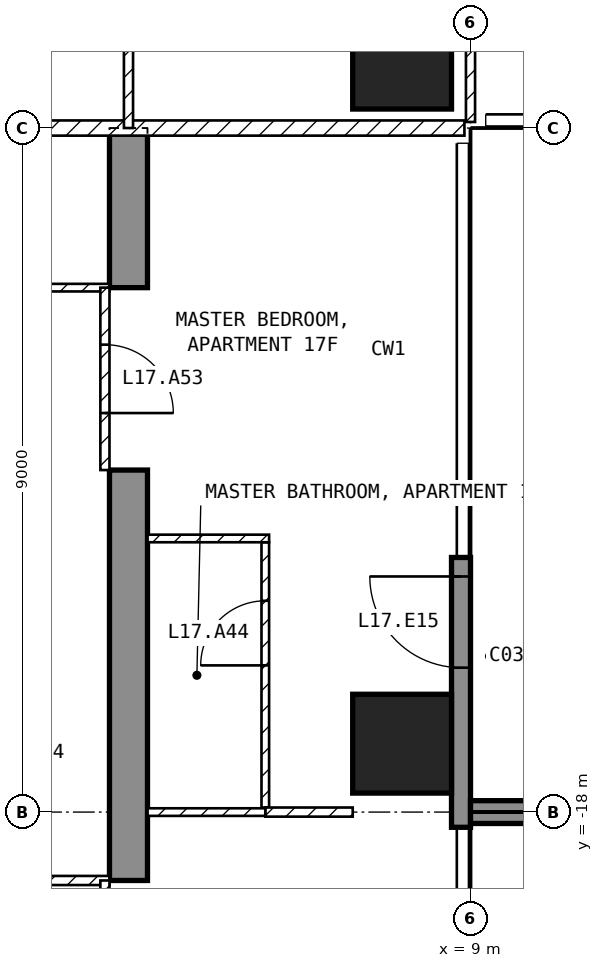
"""IFC4 building model, lengths in metres.
Left out: names, types, materials, properties, quantities, classifications, styles, units other than length and angle.
Written with IfcOpenShell. Run it as: python <this file> out.ifc"""

import sys

from ifc_helpers import new_model, si_unit, direction, frame, frame_2d, origin, origin_2d, place, context, subcontext, project, spatial, polyline, rectangle, outline, extrude, element, fill, save


model = new_model("IFC4")
c1 = context("Model", 3, precision=1e-05, world=origin(), true_north=direction((0.0, 1.0)))
c2 = subcontext(c1, "Body", "Model", "MODEL_VIEW")
j1 = project(units=[si_unit("LENGTHUNIT", "METRE"), si_unit("PLANEANGLEUNIT", "RADIAN")], contexts=[c1])
p1 = place(None, origin())
s1 = spatial("IfcSite", under=j1, at=p1, CompositionType="ELEMENT")
p2 = place(p1, origin())
s2 = spatial("IfcBuilding", under=s1, at=p2, CompositionType="ELEMENT")
p3 = place(p2, frame((0.0, 0.0, 78.5)))
s3 = spatial("IfcBuildingStorey", under=s2, at=p3, CompositionType="ELEMENT", Elevation=78.5)
for number, where, z_axis, x_axis in (
    (1, (8.1, -17.1, -0.25), (0.0, 0.0, 1.0), (1.0, 0.0, 0.0)),
    (2, (8.1, -8.1, -0.25), (0.0, 0.0, 1.0), (1.0, 0.0, 0.0)),
):
    element("IfcColumn", number, at=place(p3, frame(where, z_axis=z_axis, x_axis=x_axis)), inside=s3, PredefinedType="COLUMN", context=c2, shape_type="SweptSolid", body=[
        extrude(rectangle(XDim=1.3, YDim=1.3, at=origin_2d()), origin(), (0.0, 0.0, 1.0), 3.5),
    ])
p4 = place(p3, frame((4.25, -25.45, -0.25), z_axis=(1.0, 0.0, 0.0), x_axis=(0.0, 1.0, 0.0)))
e3 = element("IfcWall", 3, at=p4, inside=s3, PredefinedType="SHEAR", context=c2, shape_type="SweptSolid", body=[
    extrude(outline(polyline([(0.0, 0.0), (4.15, 0.0), (4.15, 2.65), (6.55, 2.65), (6.55, 0.0), (11.95, 0.0), (11.95, 2.65), (14.35, 2.65), (14.35, 0.0), (16.45, 0.0), (16.45, 3.5), (0.0, 3.5), (0.0, 0.0)])), origin(), (0.0, 0.0, 1.0), 0.5),
])
p5 = place(p3, frame((8.875, -18.2, 0.0), z_axis=(0.0, 0.0, 1.0), x_axis=(0.0, 1.0, 0.0)))
e4 = element("IfcWall", 4, at=p5, inside=s3, PredefinedType="SOLIDWALL", context=c2, shape_type="SweptSolid", body=[
    extrude(rectangle(XDim=3.55, YDim=0.25, at=frame_2d((1.775, 0.0))), origin(), (0.0, 0.0, 1.0), 3.25),
])
p6 = place(p5, frame((2.1, 0.0, 0.0)))
e5 = element("IfcOpeningElement", 5, at=p6, cuts=e4, PredefinedType="OPENING", context=c2, shape_type="SweptSolid", body=[
    extrude(rectangle(XDim=1.2, YDim=2.4, at=frame_2d((0.6, 1.2))), frame((0.0, 0.135, 0.0), z_axis=(0.0, -1.0, 0.0), x_axis=(1.0, 0.0, 0.0)), (0.0, 0.0, 1.0), 0.27),
])
p7 = place(p3, frame((9.0, -18.0, 0.0), z_axis=(0.0, 0.0, 1.0), x_axis=(1.0, 0.0, 0.0)))
e6 = element("IfcWall", 6, at=p7, inside=s3, PredefinedType="SOLIDWALL", context=c2, shape_type="SweptSolid", body=[
    extrude(rectangle(XDim=2.7, YDim=0.3, at=frame_2d((1.35, 0.0))), origin(), (0.0, 0.0, 1.0), 3.25),
])
p8 = place(p3, frame((8.92, -9.0, 0.0), z_axis=(0.0, 0.0, 1.0), x_axis=(-1.0, 0.0, 0.0)))
e7 = element("IfcWall", 7, at=p8, inside=s3, PredefinedType="PARTITIONING", context=c2, shape_type="SweptSolid", body=[
    extrude(rectangle(XDim=17.84, YDim=0.2, at=frame_2d((8.92, 0.0))), origin(), (0.0, 0.0, 1.0), 3.25),
])
p9 = place(p8, frame((8.42, 0.0, 0.0)))
e8 = element("IfcOpeningElement", 8, at=p9, cuts=e7, PredefinedType="OPENING", context=c2, shape_type="SweptSolid", body=[
    extrude(rectangle(XDim=1.0, YDim=2.1, at=frame_2d((0.5, 1.05))), frame((0.0, 0.11, 0.0), z_axis=(0.0, -1.0, 0.0), x_axis=(1.0, 0.0, 0.0)), (0.0, 0.0, 1.0), 0.22),
])
p10 = place(p3, frame((9.0, -8.92, 0.0), z_axis=(0.0, 0.0, 1.0), x_axis=(0.0, 1.0, 0.0)))
e9 = element("IfcWall", 9, at=p10, inside=s3, PredefinedType="PARTITIONING", context=c2, shape_type="SweptSolid", body=[
    extrude(rectangle(XDim=7.62, YDim=0.12, at=frame_2d((3.81, 0.0))), origin(), (0.0, 0.0, 1.0), 3.25),
])
p11 = place(p10, frame((2.67, 0.0, 0.0)))
e10 = element("IfcOpeningElement", 10, at=p11, cuts=e9, PredefinedType="OPENING", context=c2, shape_type="SweptSolid", body=[
    extrude(rectangle(XDim=0.9, YDim=2.1, at=frame_2d((0.45, 1.05))), frame((0.0, 0.07, 0.0), z_axis=(0.0, -1.0, 0.0), x_axis=(1.0, 0.0, 0.0)), (0.0, 0.0, 1.0), 0.14),
])
p12 = place(p3, frame((4.5, -9.0, 0.0), z_axis=(0.0, 0.0, 1.0), x_axis=(0.0, 1.0, 0.0)))
e11 = element("IfcWall", 11, at=p12, inside=s3, PredefinedType="PARTITIONING", context=c2, shape_type="SweptSolid", body=[
    extrude(rectangle(XDim=3.9, YDim=0.12, at=frame_2d((1.95, 0.0))), origin(), (0.0, 0.0, 1.0), 3.25),
])
p13 = place(p12, frame((1.5, 0.0, 0.0)))
e12 = element("IfcOpeningElement", 12, at=p13, cuts=e11, PredefinedType="OPENING", context=c2, shape_type="SweptSolid", body=[
    extrude(rectangle(XDim=0.9, YDim=2.1, at=frame_2d((0.45, 1.05))), frame((0.0, 0.07, 0.0), z_axis=(0.0, -1.0, 0.0), x_axis=(1.0, 0.0, 0.0)), (0.0, 0.0, 1.0), 0.14),
])
p14 = place(p3, frame((4.25, -11.1, 0.0), z_axis=(0.0, 0.0, 1.0), x_axis=(-1.0, 0.0, 0.0)))
e13 = element("IfcWall", 13, at=p14, inside=s3, PredefinedType="PARTITIONING", context=c2, shape_type="SweptSolid", body=[
    extrude(rectangle(XDim=2.15, YDim=0.1, at=frame_2d((1.075, 0.0))), origin(), (0.0, 0.0, 1.0), 3.25),
])
p15 = place(p3, frame((4.25, -18.9, 0.0), z_axis=(0.0, 0.0, 1.0), x_axis=(-1.0, 0.0, 0.0)))
e14 = element("IfcWall", 14, at=p15, inside=s3, PredefinedType="PARTITIONING", context=c2, shape_type="SweptSolid", body=[
    extrude(rectangle(XDim=8.5, YDim=0.12, at=frame_2d((4.25, 0.0))), origin(), (0.0, 0.0, 1.0), 3.25),
])
p16 = place(p15, frame((5.675, 0.0, 0.0)))
e15 = element("IfcOpeningElement", 15, at=p16, cuts=e14, PredefinedType="OPENING", context=c2, shape_type="SweptSolid", body=[
    extrude(rectangle(XDim=0.9, YDim=2.1, at=frame_2d((0.45, 1.05))), frame((0.0, 0.07, 0.0), z_axis=(0.0, -1.0, 0.0), x_axis=(1.0, 0.0, 0.0)), (0.0, 0.0, 1.0), 0.14),
])
p17 = place(p3, frame((6.3, -17.94, 0.0), z_axis=(0.0, 0.0, 1.0), x_axis=(0.0, 1.0, 0.0)))
e16 = element("IfcWall", 16, at=p17, inside=s3, PredefinedType="PARTITIONING", context=c2, shape_type="SweptSolid", body=[
    extrude(rectangle(XDim=3.49, YDim=0.1, at=frame_2d((1.745, 0.0))), origin(), (0.0, 0.0, 1.0), 3.25),
])
p18 = place(p17, frame((1.87, 0.0, 0.0)))
e17 = element("IfcOpeningElement", 17, at=p18, cuts=e16, PredefinedType="OPENING", context=c2, shape_type="SweptSolid", body=[
    extrude(rectangle(XDim=0.85, YDim=2.1, at=frame_2d((0.425, 1.05))), frame((0.0, 0.06, 0.0), z_axis=(0.0, -1.0, 0.0), x_axis=(1.0, 0.0, 0.0)), (0.0, 0.0, 1.0), 0.12),
])
p19 = place(p3, frame((6.35, -14.4, 0.0), z_axis=(0.0, 0.0, 1.0), x_axis=(-1.0, 0.0, 0.0)))
e18 = element("IfcWall", 18, at=p19, inside=s3, PredefinedType="PARTITIONING", context=c2, shape_type="SweptSolid", body=[
    extrude(rectangle(XDim=1.6, YDim=0.1, at=frame_2d((0.8, 0.0))), origin(), (0.0, 0.0, 1.0), 3.25),
])
p20 = place(p3, frame((7.45, -18.0, 0.0), z_axis=(0.0, 0.0, 1.0), x_axis=(-1.0, 0.0, 0.0)))
e19 = element("IfcWall", 19, at=p20, inside=s3, PredefinedType="PARTITIONING", context=c2, shape_type="SweptSolid", body=[
    extrude(rectangle(XDim=1.15, YDim=0.12, at=frame_2d((0.575, 0.0))), origin(), (0.0, 0.0, 1.0), 3.25),
])
p21 = place(p3, frame((6.3, -18.0, 0.0), z_axis=(0.0, 0.0, 1.0), x_axis=(-1.0, 0.0, 0.0)))
e20 = element("IfcWall", 20, at=p21, inside=s3, PredefinedType="PARTITIONING", context=c2, shape_type="SweptSolid", body=[
    extrude(rectangle(XDim=1.55, YDim=0.1, at=frame_2d((0.775, 0.0))), origin(), (0.0, 0.0, 1.0), 3.25),
])
p22 = place(p3, frame((4.19, -11.1, 0.0), z_axis=(0.0, 0.0, 1.0), x_axis=(0.0, -1.0, 0.0)))
e21 = element("IfcWall", 21, at=p22, inside=s3, PredefinedType="PARTITIONING", context=c2, shape_type="SweptSolid", body=[
    extrude(rectangle(XDim=2.4, YDim=0.12, at=frame_2d((1.2, 0.0))), origin(), (0.0, 0.0, 1.0), 2.4),
])
p23 = place(p22, frame((0.75, 0.0, 0.0)))
e22 = element("IfcOpeningElement", 22, at=p23, cuts=e21, PredefinedType="OPENING", context=c2, shape_type="SweptSolid", body=[
    extrude(rectangle(XDim=0.9, YDim=2.1, at=frame_2d((0.45, 1.05))), frame((0.0, 0.07, 0.0), z_axis=(0.0, -1.0, 0.0), x_axis=(1.0, 0.0, 0.0)), (0.0, 0.0, 1.0), 0.14),
])
p24 = place(p3, frame((4.19, -18.9, 0.0), z_axis=(0.0, 0.0, 1.0), x_axis=(0.0, -1.0, 0.0)))
e23 = element("IfcWall", 23, at=p24, inside=s3, PredefinedType="PARTITIONING", context=c2, shape_type="SweptSolid", body=[
    extrude(rectangle(XDim=2.4, YDim=0.12, at=frame_2d((1.2, 0.0))), origin(), (0.0, 0.0, 1.0), 2.4),
])
p25 = place(p24, frame((0.75, 0.0, 0.0)))
e24 = element("IfcOpeningElement", 24, at=p25, cuts=e23, PredefinedType="OPENING", context=c2, shape_type="SweptSolid", body=[
    extrude(rectangle(XDim=0.9, YDim=2.1, at=frame_2d((0.45, 1.05))), frame((0.0, 0.07, 0.0), z_axis=(0.0, -1.0, 0.0), x_axis=(1.0, 0.0, 0.0)), (0.0, 0.0, 1.0), 0.14),
])
p26 = place(p6, origin())
e25 = element("IfcDoor", 25, at=p26, inside=s3, OperationType="SINGLE_SWING_RIGHT", PredefinedType="DOOR", context=c2, shape_type="SweptSolid", body=[
    extrude(rectangle(XDim=1.2, YDim=2.4, at=frame_2d((0.6, 1.2))), frame((0.0, 0.025, 0.0), z_axis=(0.0, -1.0, 0.0), x_axis=(1.0, 0.0, 0.0)), (0.0, 0.0, 1.0), 0.05),
])
fill(e5, e25)
p27 = place(p18, origin())
e26 = element("IfcDoor", 26, at=p27, inside=s3, OperationType="SINGLE_SWING_LEFT", PredefinedType="DOOR", context=c2, shape_type="SweptSolid", body=[
    extrude(rectangle(XDim=0.85, YDim=2.1, at=frame_2d((0.425, 1.05))), frame((0.0, 0.025, 0.0), z_axis=(0.0, -1.0, 0.0), x_axis=(1.0, 0.0, 0.0)), (0.0, 0.0, 1.0), 0.05),
])
fill(e17, e26)
p28 = place(p23, origin())
e27 = element("IfcDoor", 27, at=p28, inside=s3, OperationType="SINGLE_SWING_RIGHT", PredefinedType="DOOR", context=c2, shape_type="SweptSolid", body=[
    extrude(rectangle(XDim=0.9, YDim=2.1, at=frame_2d((0.45, 1.05))), frame((0.0, 0.025, 0.0), z_axis=(0.0, -1.0, 0.0), x_axis=(1.0, 0.0, 0.0)), (0.0, 0.0, 1.0), 0.05),
])
fill(e22, e27)
save(model, sys.argv[1])
